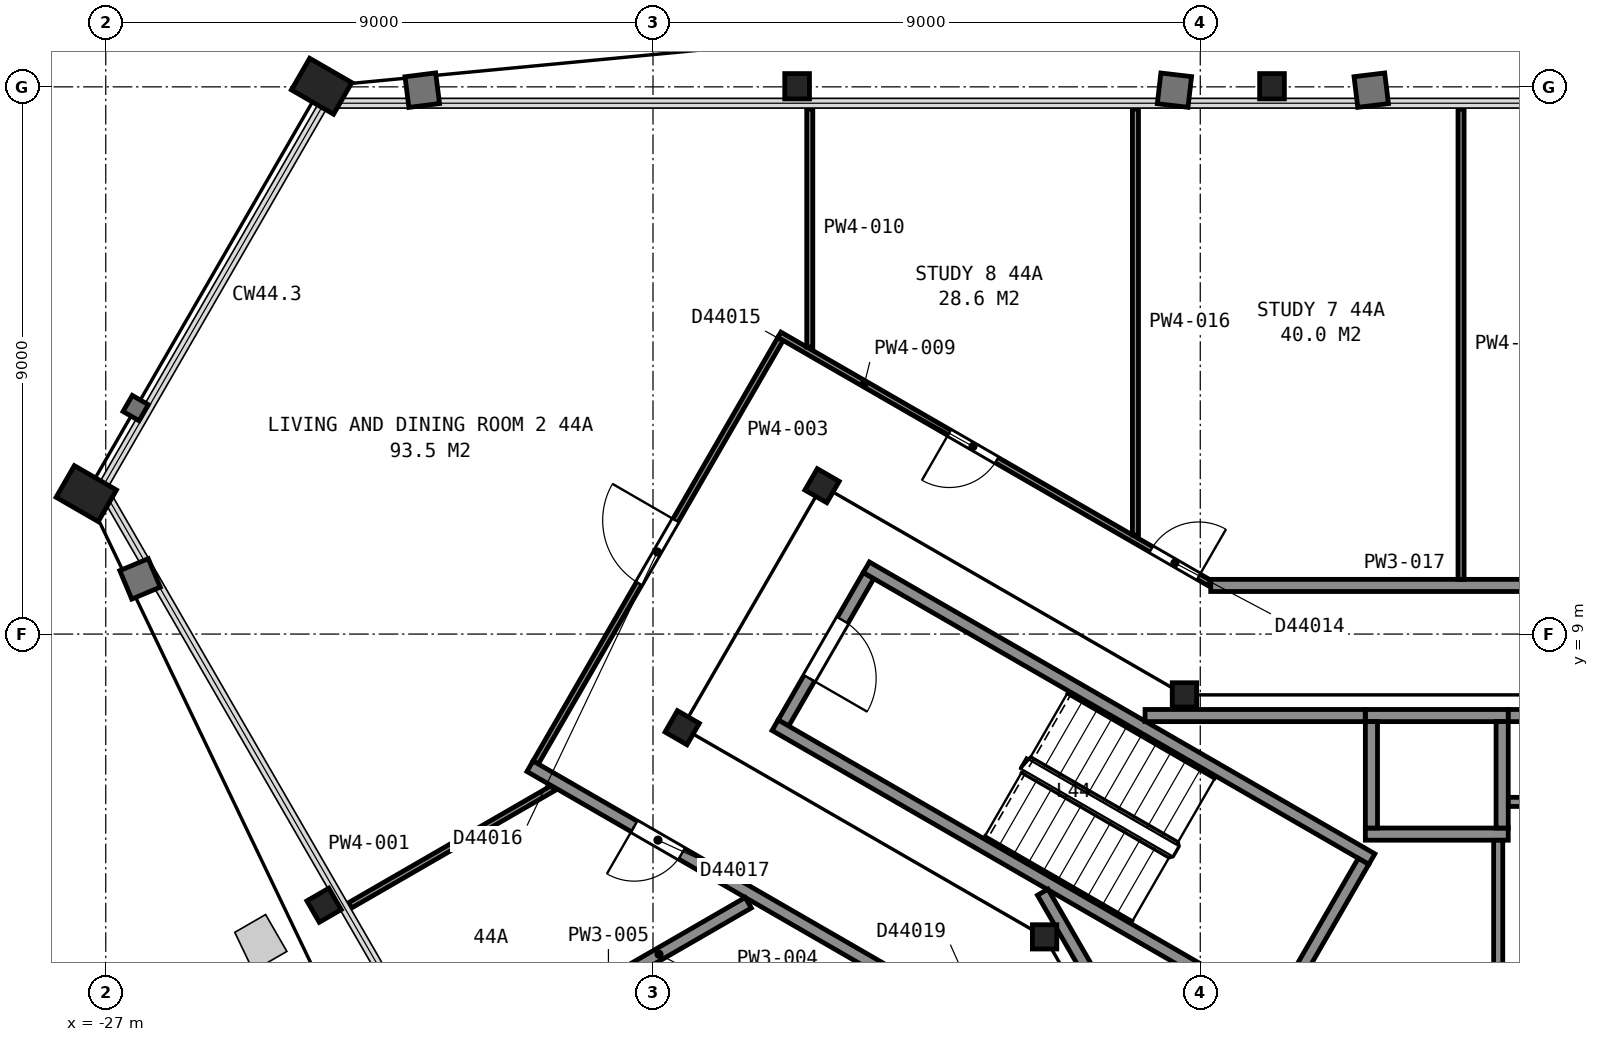
"""IFC4 building model, lengths in metres.
Left out: names, types, materials, properties, quantities, classifications, styles, units other than length and angle.
Written with IfcOpenShell. Run it as: python <this file> out.ifc"""

import sys

from ifc_helpers import new_model, si_unit, direction, frame, frame_2d, origin, origin_2d, place, context, subcontext, project, spatial, rectangle, hollow_rectangle, i_section, extrude, element, fill, save


model = new_model("IFC4")
c1 = context("Model", 3, precision=1e-05, world=origin(), true_north=direction((0.0, 1.0)))
c2 = subcontext(c1, "Body", "Model", "MODEL_VIEW")
j1 = project(units=[si_unit("LENGTHUNIT", "METRE"), si_unit("PLANEANGLEUNIT", "RADIAN")], contexts=[c1])
p1 = place(None, origin())
s1 = spatial("IfcSite", under=j1, at=p1, CompositionType="ELEMENT")
p2 = place(p1, origin())
s2 = spatial("IfcBuilding", under=s1, at=p2, CompositionType="ELEMENT")
p3 = place(p2, frame((0.0, 0.0, 178.4)))
s3 = spatial("IfcBuildingStorey", under=s2, at=p3, CompositionType="ELEMENT", Elevation=178.4)
p4 = place(p3, frame((-7.82, 18.01, 0.035), z_axis=(0.0, 0.0, 1.0), x_axis=(1.0, 0.0, 0.0)))
e1 = element("IfcColumn", 1, at=p4, inside=s3, PredefinedType="COLUMN", context=c2, shape_type="SweptSolid", body=[
    extrude(i_section(OverallWidth=0.406, OverallDepth=0.417, WebThickness=0.03, FlangeThickness=0.048, FilletRadius=0.015, at=origin_2d()), origin(), (0.0, 0.0, 1.0), 3.665),
])
p5 = place(p3, frame((-15.63, 18.01, 0.04), z_axis=(0.0, 0.0, 1.0), x_axis=(1.0, 0.0, 0.0)))
e2 = element("IfcColumn", 2, at=p5, inside=s3, PredefinedType="COLUMN", context=c2, shape_type="SweptSolid", body=[
    extrude(i_section(OverallWidth=0.406, OverallDepth=0.417, WebThickness=0.03, FlangeThickness=0.048, FilletRadius=0.015, at=origin_2d()), origin(), (0.0, 0.0, 1.0), 3.66),
])
for number, where, z_axis, x_axis in (
    (3, (-23.45, 18.01, 0.065), (0.0, 0.0, 1.0), (0.5, 0.866, 0.0)),
    (4, (-27.32, 11.31, 0.065), (0.0, 0.0, 1.0), (0.5, 0.866, 0.0)),
):
    element("IfcColumn", number, at=place(p3, frame(where, z_axis=z_axis, x_axis=x_axis)), inside=s3, PredefinedType="COLUMN", context=c2, shape_type="SweptSolid", body=[
        extrude(hollow_rectangle(XDim=0.6, YDim=0.8, WallThickness=0.05, at=origin_2d()), origin(), (0.0, 0.0, 1.0), 3.635),
    ])
p6 = place(p3, frame((-23.41, 4.54, 0.04), z_axis=(0.0, 0.0, 1.0), x_axis=(-0.5, 0.866025403784, 0.0)))
e5 = element("IfcColumn", 5, at=p6, inside=s3, PredefinedType="COLUMN", context=c2, shape_type="SweptSolid", body=[
    extrude(i_section(OverallWidth=0.406, OverallDepth=0.417, WebThickness=0.03, FlangeThickness=0.048, FilletRadius=0.015, at=origin_2d()), origin(), (0.0, 0.0, 1.0), 3.66),
])
p7 = place(p3, frame((-9.26, 8.0, 0.0), z_axis=(0.0, 0.0, 1.0), x_axis=(1.0, 0.0, 0.0)))
e6 = element("IfcColumn", 6, at=p7, inside=s3, PredefinedType="COLUMN", context=c2, shape_type="SweptSolid", body=[
    extrude(i_section(OverallWidth=0.401, OverallDepth=0.399, WebThickness=0.025, FlangeThickness=0.04, FilletRadius=0.015, at=origin_2d()), origin(), (0.0, 0.0, 1.0), 3.7),
])
for number, where, z_axis, x_axis in (
    (7, (-15.22, 11.44, 0.0), (0.0, 0.0, 1.0), (0.5, 0.866, 0.0)),
    (8, (-17.52, 7.46, 0.0), (0.0, 0.0, 1.0), (0.5, 0.866, 0.0)),
):
    element("IfcColumn", number, at=place(p3, frame(where, z_axis=z_axis, x_axis=x_axis)), inside=s3, PredefinedType="COLUMN", context=c2, shape_type="SweptSolid", body=[
        extrude(i_section(OverallWidth=0.406, OverallDepth=0.417, WebThickness=0.03, FlangeThickness=0.048, FilletRadius=0.015, at=origin_2d()), origin(), (0.0, 0.0, 1.0), 3.7),
    ])
p8 = place(p3, frame((-11.56, 4.02, 0.0), z_axis=(0.0, 0.0, 1.0), x_axis=(1.0, 0.0, 0.0)))
e9 = element("IfcColumn", 9, at=p8, inside=s3, PredefinedType="COLUMN", context=c2, shape_type="SweptSolid", body=[
    extrude(i_section(OverallWidth=0.401, OverallDepth=0.399, WebThickness=0.025, FlangeThickness=0.04, FilletRadius=0.015, at=origin_2d()), origin(), (0.0, 0.0, 1.0), 3.7),
])
p9 = place(p3, frame((-14.455, 9.962, 0.0), z_axis=(0.0, 0.0, 1.0), x_axis=(-0.500049511043, -0.865996816683, 0.0)))
e10 = element("IfcWall", 10, at=p9, inside=s3, PredefinedType="PARTITIONING", context=c2, shape_type="SweptSolid", body=[
    extrude(rectangle(XDim=2.8, YDim=0.2, at=frame_2d((1.4, 0.0))), origin(), (0.0, 0.0, 1.0), 3.45),
])
p10 = place(p9, frame((0.85, 0.0, 0.0)))
e11 = element("IfcOpeningElement", 11, at=p10, cuts=e10, PredefinedType="OPENING", context=c2, shape_type="SweptSolid", body=[
    extrude(rectangle(XDim=1.1, YDim=2.1, at=frame_2d((0.55, 1.05))), frame((0.0, 0.11, 0.0), z_axis=(0.0, -1.0, 0.0), x_axis=(1.0, 0.0, 0.0)), (0.0, 0.0, 1.0), 0.22),
])
for number, where, z_axis, x_axis in (
    (12, (-7.678, 2.701, 0.0), (0.0, 0.0, 1.0), (-0.866, 0.5, 0.0)),
    (13, (-6.178, 5.299, 0.0), (0.0, 0.0, 1.0), (-0.866, 0.5, 0.0)),
):
    element("IfcWall", number, at=place(p3, frame(where, z_axis=z_axis, x_axis=x_axis)), inside=s3, PredefinedType="PARTITIONING", context=c2, shape_type="SweptSolid", body=[
        extrude(rectangle(XDim=9.6, YDim=0.2, at=frame_2d((4.8, 0.0))), origin(), (0.0, 0.0, 1.0), 3.45),
    ])
p11 = place(p3, frame((-6.315, 5.262, 0.0), z_axis=(0.0, 0.0, 1.0), x_axis=(-0.500049511043, -0.865996816683, 0.0)))
e14 = element("IfcWall", 14, at=p11, inside=s3, PredefinedType="PARTITIONING", context=c2, shape_type="SweptSolid", body=[
    extrude(rectangle(XDim=2.8, YDim=0.2, at=frame_2d((1.4, 0.0))), origin(), (0.0, 0.0, 1.0), 3.45),
])
for number, where, z_axis, x_axis in (
    (15, (-6.285, 5.71, 0.0), (0.0, 0.0, 1.0), (1.0, 0.0, 0.0)),
    (16, (-6.285, 7.66, 0.0), (0.0, 0.0, 1.0), (1.0, 0.0, 0.0)),
):
    element("IfcWall", number, at=place(p3, frame(where, z_axis=z_axis, x_axis=x_axis)), inside=s3, PredefinedType="PARTITIONING", context=c2, shape_type="SweptSolid", body=[
        extrude(rectangle(XDim=2.35, YDim=0.2, at=frame_2d((1.175, 0.0))), origin(), (0.0, 0.0, 1.0), 3.7),
    ])
for number, where, z_axis, x_axis in (
    (17, (-4.035, 5.81, 0.0), (0.0, 0.0, 1.0), (0.0, 1.0, 0.0)),
    (18, (-6.185, 5.81, 0.0), (0.0, 0.0, 1.0), (0.0, 1.0, 0.0)),
):
    element("IfcWall", number, at=place(p3, frame(where, z_axis=z_axis, x_axis=x_axis)), inside=s3, PredefinedType="PARTITIONING", context=c2, shape_type="SweptSolid", body=[
        extrude(rectangle(XDim=1.75, YDim=0.2, at=frame_2d((0.875, 0.0))), origin(), (0.0, 0.0, 1.0), 3.7),
    ])
p12 = place(p3, frame((-11.591, 4.755, 0.0), z_axis=(0.0, 0.0, 1.0), x_axis=(0.500043977787, -0.866000011708, 0.0)))
e19 = element("IfcWall", 19, at=p12, inside=s3, PredefinedType="PARTITIONING", context=c2, shape_type="SweptSolid", body=[
    extrude(rectangle(XDim=6.617, YDim=0.2, at=frame_2d((3.308, 0.0))), origin(), (0.0, 0.0, 1.0), 3.45),
])
p13 = place(p12, frame((3.695, 0.0, 0.0)))
e20 = element("IfcOpeningElement", 20, at=p13, cuts=e19, PredefinedType="OPENING", context=c2, shape_type="SweptSolid", body=[
    extrude(rectangle(XDim=1.8, YDim=2.1, at=frame_2d((0.9, 1.05))), frame((0.0, 0.11, 0.0), z_axis=(0.0, -1.0, 0.0), x_axis=(1.0, 0.0, 0.0)), (0.0, 0.0, 1.0), 0.22),
])
p14 = place(p3, frame((-9.908, 7.66, 0.0), z_axis=(0.0, 0.0, 1.0), x_axis=(1.0, 0.0, 0.0)))
e21 = element("IfcWall", 21, at=p14, inside=s3, PredefinedType="PARTITIONING", context=c2, shape_type="SweptSolid", body=[
    extrude(rectangle(XDim=3.621, YDim=0.2, at=frame_2d((1.811, 0.0))), origin(), (0.0, 0.0, 1.0), 3.45),
])
p15 = place(p3, frame((-4.1, 2.085, 0.0), z_axis=(0.0, 0.0, 1.0), x_axis=(0.0, 1.0, 0.0)))
e22 = element("IfcWall", 22, at=p15, inside=s3, PredefinedType="PARTITIONING", context=c2, shape_type="SweptSolid", body=[
    extrude(rectangle(XDim=3.523, YDim=0.15, at=frame_2d((1.761, 0.0))), origin(), (0.0, 0.0, 1.0), 3.45),
])
p16 = place(p3, frame((-3.933, 6.24, 0.0), z_axis=(0.0, 0.0, 1.0), x_axis=(1.0, 0.0, 0.0)))
e23 = element("IfcWall", 23, at=p16, inside=s3, PredefinedType="PARTITIONING", context=c2, shape_type="SweptSolid", body=[
    extrude(rectangle(XDim=3.538, YDim=0.15, at=frame_2d((1.769, 0.0))), origin(), (0.0, 0.0, 1.0), 3.45),
])
p17 = place(p16, frame((1.3, 0.0, 0.0)))
e24 = element("IfcOpeningElement", 24, at=p17, cuts=e23, PredefinedType="OPENING", context=c2, shape_type="SweptSolid", body=[
    extrude(rectangle(XDim=1.0, YDim=2.1, at=frame_2d((0.5, 1.05))), frame((0.0, 0.085, 0.0), z_axis=(0.0, -1.0, 0.0), x_axis=(1.0, 0.0, 0.0)), (0.0, 0.0, 1.0), 0.17),
])
p18 = place(p3, frame((-3.933, 7.66, 0.0), z_axis=(0.0, 0.0, 1.0), x_axis=(1.0, 0.0, 0.0)))
e25 = element("IfcWall", 25, at=p18, inside=s3, PredefinedType="PARTITIONING", context=c2, shape_type="SweptSolid", body=[
    extrude(rectangle(XDim=13.841, YDim=0.2, at=frame_2d((6.92, 0.0))), origin(), (0.0, 0.0, 1.0), 3.45),
])
p19 = place(p3, frame((-22.983, 4.538, 0.0), z_axis=(0.0, 0.0, 1.0), x_axis=(0.865988254995, 0.500064338071, 0.0)))
e26 = element("IfcWall", 26, at=p19, inside=s3, PredefinedType="PARTITIONING", context=c2, shape_type="SweptSolid", body=[
    extrude(rectangle(XDim=3.853, YDim=0.1, at=frame_2d((1.927, 0.0))), origin(), (0.0, 0.0, 1.0), 2.713),
])
p20 = place(p3, frame((-19.93, 6.888, 0.0), z_axis=(0.0, 0.0, 1.0), x_axis=(0.500413056211, 0.865786794294, 0.0)))
e27 = element("IfcWall", 27, at=p20, inside=s3, PredefinedType="PARTITIONING", context=c2, shape_type="SweptSolid", body=[
    extrude(rectangle(XDim=8.047, YDim=0.1, at=frame_2d((4.023, 0.0))), origin(), (0.0, 0.0, 1.0), 2.713),
])
p21 = place(p20, frame((3.4, 0.0, 0.0)))
e28 = element("IfcOpeningElement", 28, at=p21, cuts=e27, PredefinedType="OPENING", context=c2, shape_type="SweptSolid", body=[
    extrude(rectangle(XDim=1.2, YDim=2.1, at=frame_2d((0.6, 1.05))), frame((0.0, 0.06, 0.0), z_axis=(0.0, -1.0, 0.0), x_axis=(1.0, 0.0, 0.0)), (0.0, 0.0, 1.0), 0.12),
])
p22 = place(p3, frame((-12.995, 2.77, 0.0), z_axis=(0.0, 0.0, 1.0), x_axis=(-0.866100425926, 0.499870035319, 0.0)))
e29 = element("IfcWall", 29, at=p22, inside=s3, PredefinedType="PARTITIONING", context=c2, shape_type="SweptSolid", body=[
    extrude(rectangle(XDim=8.115, YDim=0.2, at=frame_2d((4.058, 0.0))), origin(), (0.0, 0.0, 1.0), 2.713),
])
p23 = place(p22, frame((5.235, 0.0, 0.0)))
e30 = element("IfcOpeningElement", 30, at=p23, cuts=e29, PredefinedType="OPENING", context=c2, shape_type="SweptSolid", body=[
    extrude(rectangle(XDim=0.9, YDim=2.1, at=frame_2d((0.45, 1.05))), frame((0.0, 0.11, 0.0), z_axis=(0.0, -1.0, 0.0), x_axis=(1.0, 0.0, 0.0)), (0.0, 0.0, 1.0), 0.22),
])
p24 = place(p3, frame((-19.37, 2.886, 0.0), z_axis=(0.0, 0.0, 1.0), x_axis=(0.866036909293, 0.499980071345, 0.0)))
e31 = element("IfcWall", 31, at=p24, inside=s3, PredefinedType="PARTITIONING", context=c2, shape_type="SweptSolid", body=[
    extrude(rectangle(XDim=3.391, YDim=0.2, at=frame_2d((1.695, 0.0))), origin(), (0.0, 0.0, 1.0), 2.713),
])
p25 = place(p3, frame((-15.921, 13.923, 0.0), z_axis=(0.0, 0.0, 1.0), x_axis=(0.866088973199, -0.499889878377, 0.0)))
e32 = element("IfcWall", 32, at=p25, inside=s3, PredefinedType="PARTITIONING", context=c2, shape_type="SweptSolid", body=[
    extrude(rectangle(XDim=8.163, YDim=0.1, at=frame_2d((4.082, 0.0))), origin(), (0.0, 0.0, 1.0), 2.713),
])
p26 = place(p25, frame((7.06, 0.0, 0.0)))
e33 = element("IfcOpeningElement", 33, at=p26, cuts=e32, PredefinedType="OPENING", context=c2, shape_type="SweptSolid", body=[
    extrude(rectangle(XDim=0.9, YDim=2.1, at=frame_2d((0.45, 1.05))), frame((0.0, 0.06, 0.0), z_axis=(0.0, -1.0, 0.0), x_axis=(1.0, 0.0, 0.0)), (0.0, 0.0, 1.0), 0.12),
])
p27 = place(p25, frame((3.226, 0.0, 0.0)))
e34 = element("IfcOpeningElement", 34, at=p27, cuts=e32, PredefinedType="OPENING", context=c2, shape_type="SweptSolid", body=[
    extrude(rectangle(XDim=0.9, YDim=2.1, at=frame_2d((0.45, 1.05))), frame((0.0, 0.06, 0.0), z_axis=(0.0, -1.0, 0.0), x_axis=(1.0, 0.0, 0.0)), (0.0, 0.0, 1.0), 0.12),
])
p28 = place(p3, frame((-15.422, 13.722, 0.0), z_axis=(0.0, 0.0, 1.0), x_axis=(0.0, 1.0, 0.0)))
e35 = element("IfcWall", 35, at=p28, inside=s3, PredefinedType="PARTITIONING", context=c2, shape_type="SweptSolid", body=[
    extrude(rectangle(XDim=3.913, YDim=0.1, at=frame_2d((1.957, 0.0))), origin(), (0.0, 0.0, 1.0), 2.713),
])
p29 = place(p3, frame((-10.066, 10.631, 0.0), z_axis=(0.0, 0.0, 1.0), x_axis=(0.0, 1.0, 0.0)))
e36 = element("IfcWall", 36, at=p29, inside=s3, PredefinedType="PARTITIONING", context=c2, shape_type="SweptSolid", body=[
    extrude(rectangle(XDim=7.004, YDim=0.1, at=frame_2d((3.502, 0.0))), origin(), (0.0, 0.0, 1.0), 2.713),
])
p30 = place(p3, frame((-8.828, 9.8, 0.0), z_axis=(0.0, 0.0, 1.0), x_axis=(1.0, 0.0, 0.0)))
e37 = element("IfcWall", 37, at=p30, inside=s3, PredefinedType="PARTITIONING", context=c2, shape_type="SweptSolid", body=[
    extrude(rectangle(XDim=17.656, YDim=0.2, at=frame_2d((8.828, 0.0))), origin(), (0.0, 0.0, 1.0), 2.713),
])
p31 = place(p30, frame((11.723, 0.0, 0.0)))
e38 = element("IfcOpeningElement", 38, at=p31, cuts=e37, PredefinedType="OPENING", context=c2, shape_type="SweptSolid", body=[
    extrude(rectangle(XDim=0.9, YDim=2.1, at=frame_2d((0.45, 1.05))), frame((0.0, 0.11, 0.0), z_axis=(0.0, -1.0, 0.0), x_axis=(1.0, 0.0, 0.0)), (0.0, 0.0, 1.0), 0.22),
])
p32 = place(p30, frame((6.367, 0.0, 0.0)))
e39 = element("IfcOpeningElement", 39, at=p32, cuts=e37, PredefinedType="OPENING", context=c2, shape_type="SweptSolid", body=[
    extrude(rectangle(XDim=0.9, YDim=2.1, at=frame_2d((0.45, 1.05))), frame((0.0, 0.11, 0.0), z_axis=(0.0, -1.0, 0.0), x_axis=(1.0, 0.0, 0.0)), (0.0, 0.0, 1.0), 0.22),
])
p33 = place(p3, frame((-4.711, 9.9, 0.0), z_axis=(0.0, 0.0, 1.0), x_axis=(0.0, 1.0, 0.0)))
e40 = element("IfcWall", 40, at=p33, inside=s3, PredefinedType="PARTITIONING", context=c2, shape_type="SweptSolid", body=[
    extrude(rectangle(XDim=7.735, YDim=0.1, at=frame_2d((3.868, 0.0))), origin(), (0.0, 0.0, 1.0), 2.713),
])
p34 = place(p10, origin())
e41 = element("IfcDoor", 41, at=p34, inside=s3, OperationType="SINGLE_SWING_RIGHT", PredefinedType="DOOR", context=c2, shape_type="SweptSolid", body=[
    extrude(rectangle(XDim=1.1, YDim=2.1, at=frame_2d((0.55, 1.05))), frame((0.0, 0.025, 0.0), z_axis=(0.0, -1.0, 0.0), x_axis=(1.0, 0.0, 0.0)), (0.0, 0.0, 1.0), 0.05),
])
fill(e11, e41)
p35 = place(p21, origin())
e42 = element("IfcDoor", 42, at=p35, inside=s3, OperationType="SINGLE_SWING_RIGHT", PredefinedType="DOOR", context=c2, shape_type="SweptSolid", body=[
    extrude(rectangle(XDim=1.2, YDim=2.1, at=frame_2d((0.6, 1.05))), frame((0.0, 0.025, 0.0), z_axis=(0.0, -1.0, 0.0), x_axis=(1.0, 0.0, 0.0)), (0.0, 0.0, 1.0), 0.05),
])
fill(e28, e42)
p36 = place(p23, origin())
e43 = element("IfcDoor", 43, at=p36, inside=s3, OperationType="SINGLE_SWING_RIGHT", PredefinedType="DOOR", context=c2, shape_type="SweptSolid", body=[
    extrude(rectangle(XDim=0.9, YDim=2.1, at=frame_2d((0.45, 1.05))), frame((0.0, 0.025, 0.0), z_axis=(0.0, -1.0, 0.0), x_axis=(1.0, 0.0, 0.0)), (0.0, 0.0, 1.0), 0.05),
])
fill(e30, e43)
p37 = place(p26, origin())
e44 = element("IfcDoor", 44, at=p37, inside=s3, OperationType="SINGLE_SWING_RIGHT", PredefinedType="DOOR", context=c2, shape_type="SweptSolid", body=[
    extrude(rectangle(XDim=0.9, YDim=2.1, at=frame_2d((0.45, 1.05))), frame((0.0, 0.025, 0.0), z_axis=(0.0, -1.0, 0.0), x_axis=(1.0, 0.0, 0.0)), (0.0, 0.0, 1.0), 0.05),
])
fill(e33, e44)
p38 = place(p27, origin())
e45 = element("IfcDoor", 45, at=p38, inside=s3, OperationType="SINGLE_SWING_LEFT", PredefinedType="DOOR", context=c2, shape_type="SweptSolid", body=[
    extrude(rectangle(XDim=0.9, YDim=2.1, at=frame_2d((0.45, 1.05))), frame((0.0, 0.025, 0.0), z_axis=(0.0, -1.0, 0.0), x_axis=(1.0, 0.0, 0.0)), (0.0, 0.0, 1.0), 0.05),
])
fill(e34, e45)
save(model, sys.argv[1])
